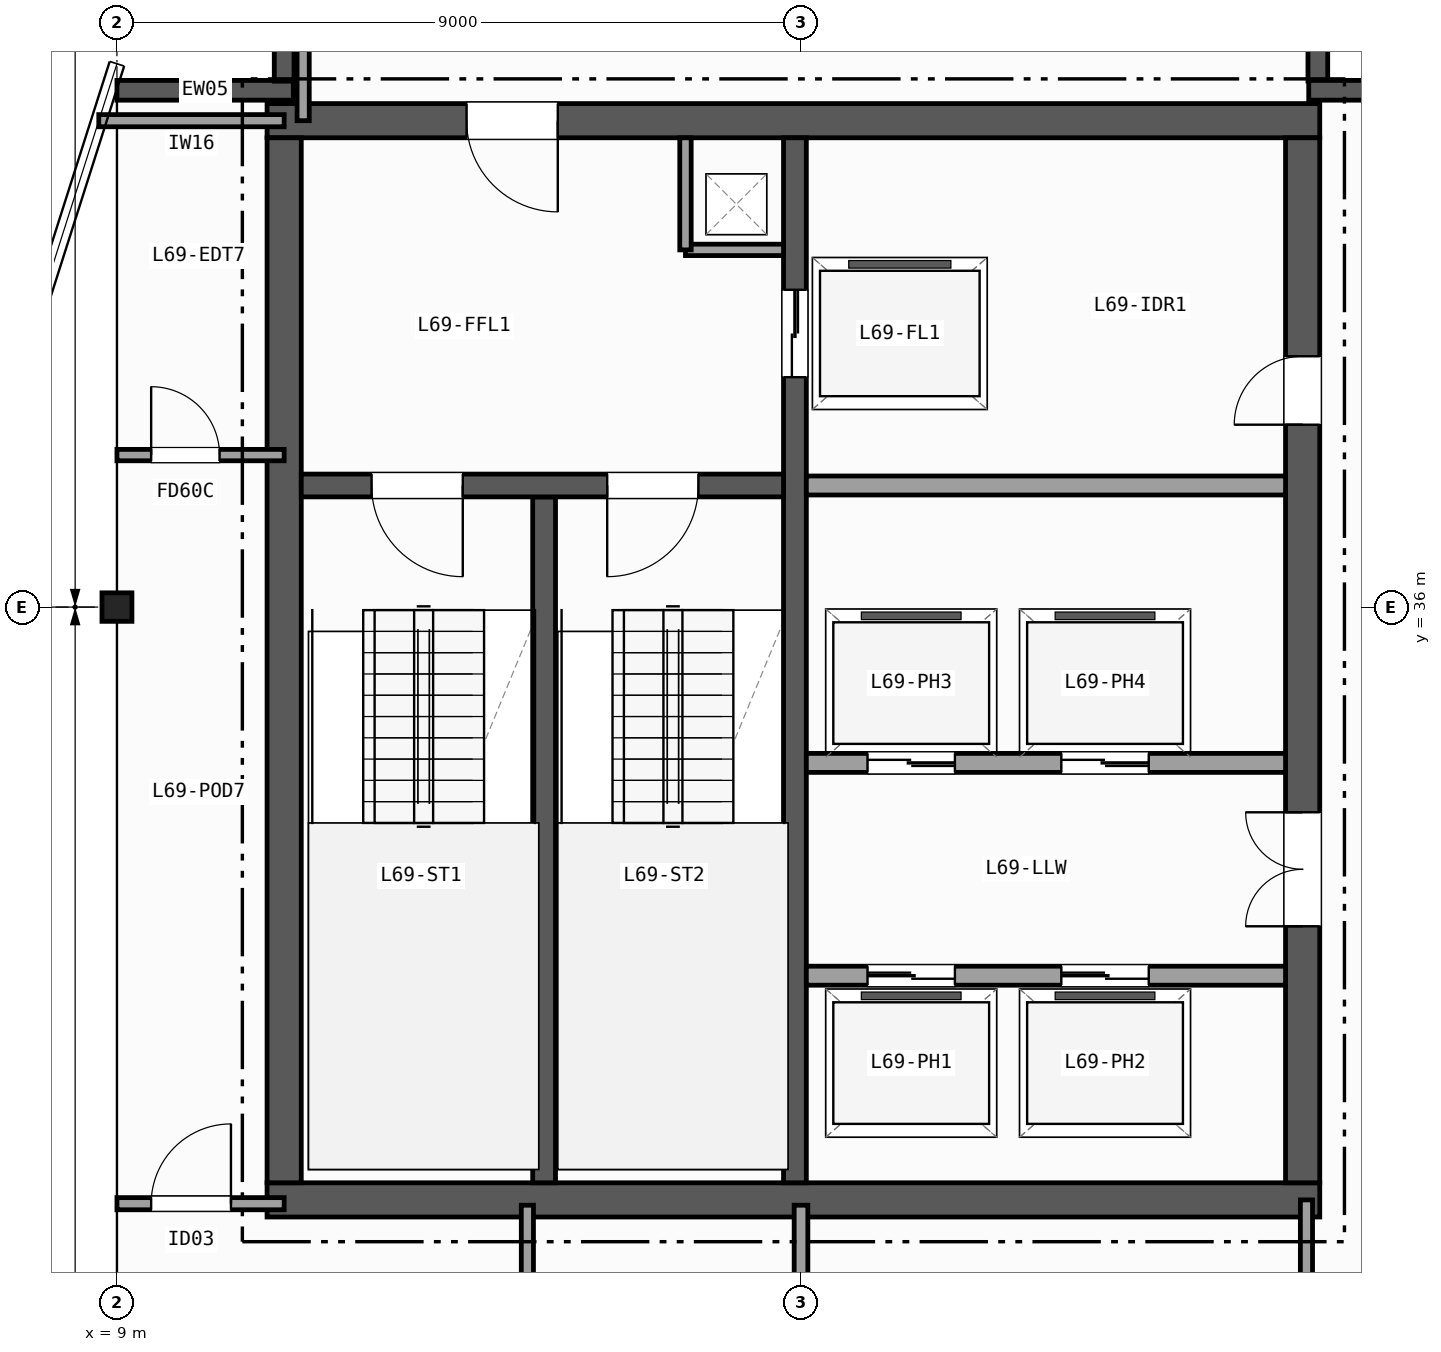
"""IFC4 building model, lengths in metres.
Left out: names, types, materials, properties, quantities, classifications, styles, units other than length and angle.
Written with IfcOpenShell. Run it as: python <this file> out.ifc"""

import sys

from ifc_helpers import new_model, si_unit, direction, frame, frame_2d, origin, origin_2d, place, context, subcontext, project, spatial, rectangle, i_section, extrude, element, fill, save


model = new_model("IFC4")
c1 = context("Model", 3, precision=1e-05, world=origin(), true_north=direction((0.0, 1.0)))
c2 = subcontext(c1, "Body", "Model", "MODEL_VIEW")
j1 = project(units=[si_unit("LENGTHUNIT", "METRE"), si_unit("PLANEANGLEUNIT", "RADIAN")], contexts=[c1])
p1 = place(None, origin())
s1 = spatial("IfcSite", under=j1, at=p1, CompositionType="ELEMENT")
p2 = place(p1, origin())
s2 = spatial("IfcBuilding", under=s1, at=p2, CompositionType="ELEMENT")
p3 = place(p2, frame((0.0, 0.0, 274.1)))
s3 = spatial("IfcBuildingStorey", under=s2, at=p3, CompositionType="ELEMENT", Elevation=274.1)
p4 = place(p3, frame((9.0, 36.0, 0.0), z_axis=(0.0, 0.0, 1.0), x_axis=(1.0, 0.0, 0.0)))
e1 = element("IfcColumn", 1, at=p4, inside=s3, PredefinedType="COLUMN", context=c2, shape_type="SweptSolid", body=[
    extrude(i_section(OverallWidth=0.394, OverallDepth=0.375, WebThickness=0.017, FlangeThickness=0.028, FilletRadius=0.015, at=origin_2d()), origin(), (0.0, 0.0, 1.0), 3.7),
])
p5 = place(p3, frame((9.0, 42.8, 0.0), z_axis=(0.0, 0.0, 1.0), x_axis=(1.0, 0.0, 0.0)))
e2 = element("IfcWall", 2, at=p5, inside=s3, PredefinedType="SOLIDWALL", context=c2, shape_type="SweptSolid", body=[
    extrude(rectangle(XDim=2.32, YDim=0.26, at=frame_2d((1.16, 0.0))), origin(), (0.0, 0.0, 1.0), 3.42),
])
for number, where, z_axis, x_axis in (
    (3, (11.2, 42.92, 0.0), (0.0, 0.0, 1.0), (0.0, 1.0, 0.0)),
    (4, (24.8, 45.0, 0.0), (0.0, 0.0, 1.0), (0.0, -1.0, 0.0)),
):
    element("IfcWall", number, at=place(p3, frame(where, z_axis=z_axis, x_axis=x_axis)), inside=s3, PredefinedType="SOLIDWALL", context=c2, shape_type="SweptSolid", body=[
        extrude(rectangle(XDim=2.08, YDim=0.26, at=frame_2d((1.04, 0.0))), origin(), (0.0, 0.0, 1.0), 3.42),
    ])
p6 = place(p3, frame((24.68, 42.8, 0.0), z_axis=(0.0, 0.0, 1.0), x_axis=(1.0, 0.0, 0.0)))
e5 = element("IfcWall", 5, at=p6, inside=s3, PredefinedType="SOLIDWALL", context=c2, shape_type="SweptSolid", body=[
    extrude(rectangle(XDim=2.32, YDim=0.26, at=frame_2d((1.16, 0.0))), origin(), (0.0, 0.0, 1.0), 3.42),
])
p7 = place(p3, frame((10.975, 28.2, 0.0), z_axis=(0.0, 0.0, 1.0), x_axis=(1.0, 0.0, 0.0)))
e6 = element("IfcWall", 6, at=p7, inside=s3, PredefinedType="SHEAR", context=c2, shape_type="SweptSolid", body=[
    extrude(rectangle(XDim=13.85, YDim=0.45, at=frame_2d((6.925, 0.0))), origin(), (0.0, 0.0, 1.0), 3.42),
])
p8 = place(p3, frame((24.825, 42.4, 0.0), z_axis=(0.0, 0.0, 1.0), x_axis=(-1.0, 0.0, 0.0)))
e7 = element("IfcWall", 7, at=p8, inside=s3, PredefinedType="SHEAR", context=c2, shape_type="SweptSolid", body=[
    extrude(rectangle(XDim=13.85, YDim=0.45, at=frame_2d((6.925, 0.0))), origin(), (0.0, 0.0, 1.0), 3.42),
])
p9 = place(p8, frame((10.025, 0.0, 0.0)))
e8 = element("IfcOpeningElement", 8, at=p9, cuts=e7, PredefinedType="OPENING", context=c2, shape_type="SweptSolid", body=[
    extrude(rectangle(XDim=1.2, YDim=2.15, at=frame_2d((0.6, 1.075))), frame((0.0, 0.235, 0.0), z_axis=(0.0, -1.0, 0.0), x_axis=(1.0, 0.0, 0.0)), (0.0, 0.0, 1.0), 0.47),
])
p10 = place(p3, frame((11.2, 42.175, 0.0), z_axis=(0.0, 0.0, 1.0), x_axis=(0.0, -1.0, 0.0)))
e9 = element("IfcWall", 9, at=p10, inside=s3, PredefinedType="SHEAR", context=c2, shape_type="SweptSolid", body=[
    extrude(rectangle(XDim=13.75, YDim=0.45, at=frame_2d((6.875, 0.0))), origin(), (0.0, 0.0, 1.0), 3.42),
])
p11 = place(p3, frame((24.6, 28.425, 0.0), z_axis=(0.0, 0.0, 1.0), x_axis=(0.0, 1.0, 0.0)))
e10 = element("IfcWall", 10, at=p11, inside=s3, PredefinedType="SHEAR", context=c2, shape_type="SweptSolid", body=[
    extrude(rectangle(XDim=13.75, YDim=0.45, at=frame_2d((6.875, 0.0))), origin(), (0.0, 0.0, 1.0), 3.42),
])
p12 = place(p11, frame((3.375, 0.0, 0.0)))
e11 = element("IfcOpeningElement", 11, at=p12, cuts=e10, PredefinedType="OPENING", context=c2, shape_type="SweptSolid", body=[
    extrude(rectangle(XDim=1.5, YDim=2.2, at=frame_2d((0.75, 1.1))), frame((0.0, 0.235, 0.0), z_axis=(0.0, -1.0, 0.0), x_axis=(1.0, 0.0, 0.0)), (0.0, 0.0, 1.0), 0.47),
])
p13 = place(p11, frame((9.975, 0.0, 0.0)))
e12 = element("IfcOpeningElement", 12, at=p13, cuts=e10, PredefinedType="OPENING", context=c2, shape_type="SweptSolid", body=[
    extrude(rectangle(XDim=0.9, YDim=2.1, at=frame_2d((0.45, 1.05))), frame((0.0, 0.235, 0.0), z_axis=(0.0, -1.0, 0.0), x_axis=(1.0, 0.0, 0.0)), (0.0, 0.0, 1.0), 0.47),
])
p14 = place(p3, frame((14.62, 28.425, 0.0), z_axis=(0.0, 0.0, 1.0), x_axis=(0.0, 1.0, 0.0)))
e13 = element("IfcWall", 13, at=p14, inside=s3, PredefinedType="SHEAR", context=c2, shape_type="SweptSolid", body=[
    extrude(rectangle(XDim=9.025, YDim=0.3, at=frame_2d((4.512, 0.0))), origin(), (0.0, 0.0, 1.0), 3.42),
])
p15 = place(p3, frame((17.92, 42.175, 0.0), z_axis=(0.0, 0.0, 1.0), x_axis=(0.0, -1.0, 0.0)))
e14 = element("IfcWall", 14, at=p15, inside=s3, PredefinedType="SHEAR", context=c2, shape_type="SweptSolid", body=[
    extrude(rectangle(XDim=13.75, YDim=0.3, at=frame_2d((6.875, 0.0))), origin(), (0.0, 0.0, 1.0), 3.42),
])
p16 = place(p15, frame((2.0, 0.0, 0.0)))
e15 = element("IfcOpeningElement", 15, at=p16, cuts=e14, PredefinedType="OPENING", context=c2, shape_type="SweptSolid", body=[
    extrude(rectangle(XDim=1.15, YDim=2.15, at=frame_2d((0.575, 1.075))), frame((0.0, 0.16, 0.0), z_axis=(0.0, -1.0, 0.0), x_axis=(1.0, 0.0, 0.0)), (0.0, 0.0, 1.0), 0.32),
])
p17 = place(p3, frame((17.77, 37.6, 0.0), z_axis=(0.0, 0.0, 1.0), x_axis=(-1.0, 0.0, 0.0)))
e16 = element("IfcWall", 16, at=p17, inside=s3, PredefinedType="SHEAR", context=c2, shape_type="SweptSolid", body=[
    extrude(rectangle(XDim=6.345, YDim=0.3, at=frame_2d((3.172, 0.0))), origin(), (0.0, 0.0, 1.0), 3.42),
])
p18 = place(p17, frame((4.22, 0.0, 0.0)))
e17 = element("IfcOpeningElement", 17, at=p18, cuts=e16, PredefinedType="OPENING", context=c2, shape_type="SweptSolid", body=[
    extrude(rectangle(XDim=1.2, YDim=2.15, at=frame_2d((0.6, 1.075))), frame((0.0, 0.16, 0.0), z_axis=(0.0, -1.0, 0.0), x_axis=(1.0, 0.0, 0.0)), (0.0, 0.0, 1.0), 0.32),
])
p19 = place(p17, frame((1.12, 0.0, 0.0)))
e18 = element("IfcOpeningElement", 18, at=p19, cuts=e16, PredefinedType="OPENING", context=c2, shape_type="SweptSolid", body=[
    extrude(rectangle(XDim=1.2, YDim=2.15, at=frame_2d((0.6, 1.075))), frame((0.0, 0.16, 0.0), z_axis=(0.0, -1.0, 0.0), x_axis=(1.0, 0.0, 0.0)), (0.0, 0.0, 1.0), 0.32),
])
p20 = place(p3, frame((16.48, 40.7, 0.0), z_axis=(0.0, 0.0, 1.0), x_axis=(1.0, 0.0, 0.0)))
e19 = element("IfcWall", 19, at=p20, inside=s3, PredefinedType="PARTITIONING", context=c2, shape_type="SweptSolid", body=[
    extrude(rectangle(XDim=1.29, YDim=0.15, at=frame_2d((0.645, 0.0))), origin(), (0.0, 0.0, 1.0), 3.42),
])
p21 = place(p3, frame((16.48, 40.7, 0.0), z_axis=(0.0, 0.0, 1.0), x_axis=(0.0, 1.0, 0.0)))
e20 = element("IfcWall", 20, at=p21, inside=s3, PredefinedType="PARTITIONING", context=c2, shape_type="SweptSolid", body=[
    extrude(rectangle(XDim=1.475, YDim=0.15, at=frame_2d((0.738, 0.0))), origin(), (0.0, 0.0, 1.0), 3.42),
])
p22 = place(p3, frame((18.07, 37.6, 0.0), z_axis=(0.0, 0.0, 1.0), x_axis=(1.0, 0.0, 0.0)))
e21 = element("IfcWall", 21, at=p22, inside=s3, PredefinedType="PARTITIONING", context=c2, shape_type="SweptSolid", body=[
    extrude(rectangle(XDim=6.305, YDim=0.25, at=frame_2d((3.152, 0.0))), origin(), (0.0, 0.0, 1.0), 3.42),
])
p23 = place(p3, frame((18.07, 31.15, 0.0), z_axis=(0.0, 0.0, 1.0), x_axis=(1.0, 0.0, 0.0)))
e22 = element("IfcWall", 22, at=p23, inside=s3, PredefinedType="PARTITIONING", context=c2, shape_type="SweptSolid", body=[
    extrude(rectangle(XDim=6.305, YDim=0.25, at=frame_2d((3.152, 0.0))), origin(), (0.0, 0.0, 1.0), 3.42),
])
p24 = place(p23, frame((0.805, 0.0, 0.0)))
e23 = element("IfcOpeningElement", 23, at=p24, cuts=e22, PredefinedType="OPENING", context=c2, shape_type="SweptSolid", body=[
    extrude(rectangle(XDim=1.15, YDim=2.15, at=frame_2d((0.575, 1.075))), frame((0.0, 0.135, 0.0), z_axis=(0.0, -1.0, 0.0), x_axis=(1.0, 0.0, 0.0)), (0.0, 0.0, 1.0), 0.27),
])
p25 = place(p23, frame((3.355, 0.0, 0.0)))
e24 = element("IfcOpeningElement", 24, at=p25, cuts=e22, PredefinedType="OPENING", context=c2, shape_type="SweptSolid", body=[
    extrude(rectangle(XDim=1.15, YDim=2.15, at=frame_2d((0.575, 1.075))), frame((0.0, 0.135, 0.0), z_axis=(0.0, -1.0, 0.0), x_axis=(1.0, 0.0, 0.0)), (0.0, 0.0, 1.0), 0.27),
])
p26 = place(p3, frame((24.375, 33.95, 0.0), z_axis=(0.0, 0.0, 1.0), x_axis=(-1.0, 0.0, 0.0)))
e25 = element("IfcWall", 25, at=p26, inside=s3, PredefinedType="PARTITIONING", context=c2, shape_type="SweptSolid", body=[
    extrude(rectangle(XDim=6.305, YDim=0.25, at=frame_2d((3.152, 0.0))), origin(), (0.0, 0.0, 1.0), 3.42),
])
p27 = place(p26, frame((4.35, 0.0, 0.0)))
e26 = element("IfcOpeningElement", 26, at=p27, cuts=e25, PredefinedType="OPENING", context=c2, shape_type="SweptSolid", body=[
    extrude(rectangle(XDim=1.15, YDim=2.15, at=frame_2d((0.575, 1.075))), frame((0.0, 0.135, 0.0), z_axis=(0.0, -1.0, 0.0), x_axis=(1.0, 0.0, 0.0)), (0.0, 0.0, 1.0), 0.27),
])
p28 = place(p26, frame((1.8, 0.0, 0.0)))
e27 = element("IfcOpeningElement", 27, at=p28, cuts=e25, PredefinedType="OPENING", context=c2, shape_type="SweptSolid", body=[
    extrude(rectangle(XDim=1.15, YDim=2.15, at=frame_2d((0.575, 1.075))), frame((0.0, 0.135, 0.0), z_axis=(0.0, -1.0, 0.0), x_axis=(1.0, 0.0, 0.0)), (0.0, 0.0, 1.0), 0.27),
])
p29 = place(p3, frame((9.0, 28.15, 0.0), z_axis=(0.0, 0.0, 1.0), x_axis=(1.0, 0.0, 0.0)))
e28 = element("IfcWall", 28, at=p29, inside=s3, PredefinedType="PARTITIONING", context=c2, shape_type="SweptSolid", body=[
    extrude(rectangle(XDim=2.2, YDim=0.16, at=frame_2d((1.1, 0.0))), origin(), (0.0, 0.0, 1.0), 2.707),
])
p30 = place(p29, frame((0.45, 0.0, 0.0)))
e29 = element("IfcOpeningElement", 29, at=p30, cuts=e28, PredefinedType="OPENING", context=c2, shape_type="SweptSolid", body=[
    extrude(rectangle(XDim=1.05, YDim=2.15, at=frame_2d((0.525, 1.075))), frame((0.0, 0.09, 0.0), z_axis=(0.0, -1.0, 0.0), x_axis=(1.0, 0.0, 0.0)), (0.0, 0.0, 1.0), 0.18),
])
p31 = place(p3, frame((8.761, 42.4, 0.0), z_axis=(0.0, 0.0, 1.0), x_axis=(1.0, 0.0, 0.0)))
e30 = element("IfcWall", 30, at=p31, inside=s3, PredefinedType="PARTITIONING", context=c2, shape_type="SweptSolid", body=[
    extrude(rectangle(XDim=2.439, YDim=0.16, at=frame_2d((1.219, 0.0))), origin(), (0.0, 0.0, 1.0), 3.42),
])
p32 = place(p3, frame((11.45, 42.4, 0.0), z_axis=(0.0, 0.0, 1.0), x_axis=(0.0, 1.0, 0.0)))
e31 = element("IfcWall", 31, at=p32, inside=s3, PredefinedType="PARTITIONING", context=c2, shape_type="SweptSolid", body=[
    extrude(rectangle(XDim=2.666, YDim=0.16, at=frame_2d((1.333, 0.0))), origin(), (0.0, 0.0, 1.0), 3.42),
])
p33 = place(p3, frame((9.0, 38.0, 0.0), z_axis=(0.0, 0.0, 1.0), x_axis=(1.0, 0.0, 0.0)))
e32 = element("IfcWall", 32, at=p33, inside=s3, PredefinedType="PARTITIONING", context=c2, shape_type="SweptSolid", body=[
    extrude(rectangle(XDim=2.2, YDim=0.15, at=frame_2d((1.1, 0.0))), origin(), (0.0, 0.0, 1.0), 3.42),
])
p34 = place(p33, frame((0.45, 0.0, 0.0)))
e33 = element("IfcOpeningElement", 33, at=p34, cuts=e32, PredefinedType="OPENING", context=c2, shape_type="SweptSolid", body=[
    extrude(rectangle(XDim=0.9, YDim=2.1, at=frame_2d((0.45, 1.05))), frame((0.0, 0.085, 0.0), z_axis=(0.0, -1.0, 0.0), x_axis=(1.0, 0.0, 0.0)), (0.0, 0.0, 1.0), 0.17),
])
p35 = place(p3, frame((24.65, 9.0, 0.0), z_axis=(0.0, 0.0, 1.0), x_axis=(0.0, 1.0, 0.0)))
e34 = element("IfcWall", 34, at=p35, inside=s3, PredefinedType="PARTITIONING", context=c2, shape_type="SweptSolid", body=[
    extrude(rectangle(XDim=19.2, YDim=0.16, at=frame_2d((9.6, 0.0))), origin(), (0.0, 0.0, 1.0), 2.707),
])
p36 = place(p35, frame((10.2, 0.0, 0.0)))
e35 = element("IfcOpeningElement", 35, at=p36, cuts=e34, PredefinedType="OPENING", context=c2, shape_type="SweptSolid", body=[
    extrude(rectangle(XDim=0.86, YDim=2.05, at=frame_2d((0.43, 1.025))), frame((0.0, 0.09, 0.0), z_axis=(0.0, -1.0, 0.0), x_axis=(1.0, 0.0, 0.0)), (0.0, 0.0, 1.0), 0.18),
])
p37 = place(p35, frame((2.55, 0.0, 0.0)))
e36 = element("IfcOpeningElement", 36, at=p37, cuts=e34, PredefinedType="OPENING", context=c2, shape_type="SweptSolid", body=[
    extrude(rectangle(XDim=0.95, YDim=2.1, at=frame_2d((0.475, 1.05))), frame((0.0, 0.09, 0.0), z_axis=(0.0, -1.0, 0.0), x_axis=(1.0, 0.0, 0.0)), (0.0, 0.0, 1.0), 0.18),
])
p38 = place(p3, frame((18.0, 17.4, 0.0), z_axis=(0.0, 0.0, 1.0), x_axis=(0.0, 1.0, 0.0)))
e37 = element("IfcWall", 37, at=p38, inside=s3, PredefinedType="PARTITIONING", context=c2, shape_type="SweptSolid", body=[
    extrude(rectangle(XDim=10.73, YDim=0.18, at=frame_2d((5.365, 0.0))), origin(), (0.0, 0.0, 1.0), 2.789),
])
p39 = place(p38, frame((4.1, 0.0, 0.0)))
e38 = element("IfcOpeningElement", 38, at=p39, cuts=e37, PredefinedType="OPENING", context=c2, shape_type="SweptSolid", body=[
    extrude(rectangle(XDim=1.0, YDim=2.1, at=frame_2d((0.5, 1.05))), frame((0.0, 0.1, 0.0), z_axis=(0.0, -1.0, 0.0), x_axis=(1.0, 0.0, 0.0)), (0.0, 0.0, 1.0), 0.2),
])
p40 = place(p3, frame((14.4, 18.0, 0.0), z_axis=(0.0, 0.0, 1.0), x_axis=(0.0, 1.0, 0.0)))
e39 = element("IfcWall", 39, at=p40, inside=s3, PredefinedType="PARTITIONING", context=c2, shape_type="SweptSolid", body=[
    extrude(rectangle(XDim=10.13, YDim=0.16, at=frame_2d((5.065, 0.0))), origin(), (0.0, 0.0, 1.0), 2.789),
])
p41 = place(p40, frame((2.5, 0.0, 0.0)))
e40 = element("IfcOpeningElement", 40, at=p41, cuts=e39, PredefinedType="OPENING", context=c2, shape_type="SweptSolid", body=[
    extrude(rectangle(XDim=1.05, YDim=2.15, at=frame_2d((0.525, 1.075))), frame((0.0, 0.09, 0.0), z_axis=(0.0, -1.0, 0.0), x_axis=(1.0, 0.0, 0.0)), (0.0, 0.0, 1.0), 0.18),
])
p42 = place(p18, origin())
e41 = element("IfcDoor", 41, at=p42, inside=s3, OperationType="SINGLE_SWING_LEFT", PredefinedType="DOOR", context=c2, shape_type="SweptSolid", body=[
    extrude(rectangle(XDim=1.2, YDim=2.15, at=frame_2d((0.6, 1.075))), frame((0.0, 0.025, 0.0), z_axis=(0.0, -1.0, 0.0), x_axis=(1.0, 0.0, 0.0)), (0.0, 0.0, 1.0), 0.05),
])
fill(e17, e41)
p43 = place(p19, origin())
e42 = element("IfcDoor", 42, at=p43, inside=s3, OperationType="SINGLE_SWING_RIGHT", PredefinedType="DOOR", context=c2, shape_type="SweptSolid", body=[
    extrude(rectangle(XDim=1.2, YDim=2.15, at=frame_2d((0.6, 1.075))), frame((0.0, 0.025, 0.0), z_axis=(0.0, -1.0, 0.0), x_axis=(1.0, 0.0, 0.0)), (0.0, 0.0, 1.0), 0.05),
])
fill(e18, e42)
p44 = place(p12, origin())
e43 = element("IfcDoor", 43, at=p44, inside=s3, OperationType="DOUBLE_DOOR_SINGLE_SWING", PredefinedType="DOOR", context=c2, shape_type="SweptSolid", body=[
    extrude(rectangle(XDim=1.5, YDim=2.2, at=frame_2d((0.75, 1.1))), frame((0.0, 0.025, 0.0), z_axis=(0.0, -1.0, 0.0), x_axis=(1.0, 0.0, 0.0)), (0.0, 0.0, 1.0), 0.05),
])
fill(e11, e43)
p45 = place(p9, origin())
e44 = element("IfcDoor", 44, at=p45, inside=s3, OperationType="SINGLE_SWING_LEFT", PredefinedType="DOOR", context=c2, shape_type="SweptSolid", body=[
    extrude(rectangle(XDim=1.2, YDim=2.15, at=frame_2d((0.6, 1.075))), frame((0.0, 0.025, 0.0), z_axis=(0.0, -1.0, 0.0), x_axis=(1.0, 0.0, 0.0)), (0.0, 0.0, 1.0), 0.05),
])
fill(e8, e44)
p46 = place(p13, origin())
e45 = element("IfcDoor", 45, at=p46, inside=s3, OperationType="SINGLE_SWING_LEFT", PredefinedType="DOOR", context=c2, shape_type="SweptSolid", body=[
    extrude(rectangle(XDim=0.9, YDim=2.1, at=frame_2d((0.45, 1.05))), frame((0.0, 0.025, 0.0), z_axis=(0.0, -1.0, 0.0), x_axis=(1.0, 0.0, 0.0)), (0.0, 0.0, 1.0), 0.05),
])
fill(e12, e45)
p47 = place(p16, origin())
e46 = element("IfcDoor", 46, at=p47, inside=s3, OperationType="DOUBLE_DOOR_SLIDING", PredefinedType="DOOR", context=c2, shape_type="SweptSolid", body=[
    extrude(rectangle(XDim=1.15, YDim=2.15, at=frame_2d((0.575, 1.075))), frame((0.0, 0.025, 0.0), z_axis=(0.0, -1.0, 0.0), x_axis=(1.0, 0.0, 0.0)), (0.0, 0.0, 1.0), 0.05),
])
fill(e15, e46)
p48 = place(p24, origin())
e47 = element("IfcDoor", 47, at=p48, inside=s3, OperationType="DOUBLE_DOOR_SLIDING", PredefinedType="DOOR", context=c2, shape_type="SweptSolid", body=[
    extrude(rectangle(XDim=1.15, YDim=2.15, at=frame_2d((0.575, 1.075))), frame((0.0, 0.025, 0.0), z_axis=(0.0, -1.0, 0.0), x_axis=(1.0, 0.0, 0.0)), (0.0, 0.0, 1.0), 0.05),
])
fill(e23, e47)
p49 = place(p25, origin())
e48 = element("IfcDoor", 48, at=p49, inside=s3, OperationType="DOUBLE_DOOR_SLIDING", PredefinedType="DOOR", context=c2, shape_type="SweptSolid", body=[
    extrude(rectangle(XDim=1.15, YDim=2.15, at=frame_2d((0.575, 1.075))), frame((0.0, 0.025, 0.0), z_axis=(0.0, -1.0, 0.0), x_axis=(1.0, 0.0, 0.0)), (0.0, 0.0, 1.0), 0.05),
])
fill(e24, e48)
p50 = place(p27, origin())
e49 = element("IfcDoor", 49, at=p50, inside=s3, OperationType="DOUBLE_DOOR_SLIDING", PredefinedType="DOOR", context=c2, shape_type="SweptSolid", body=[
    extrude(rectangle(XDim=1.15, YDim=2.15, at=frame_2d((0.575, 1.075))), frame((0.0, 0.025, 0.0), z_axis=(0.0, -1.0, 0.0), x_axis=(1.0, 0.0, 0.0)), (0.0, 0.0, 1.0), 0.05),
])
fill(e26, e49)
p51 = place(p28, origin())
e50 = element("IfcDoor", 50, at=p51, inside=s3, OperationType="DOUBLE_DOOR_SLIDING", PredefinedType="DOOR", context=c2, shape_type="SweptSolid", body=[
    extrude(rectangle(XDim=1.15, YDim=2.15, at=frame_2d((0.575, 1.075))), frame((0.0, 0.025, 0.0), z_axis=(0.0, -1.0, 0.0), x_axis=(1.0, 0.0, 0.0)), (0.0, 0.0, 1.0), 0.05),
])
fill(e27, e50)
p52 = place(p30, origin())
e51 = element("IfcDoor", 51, at=p52, inside=s3, OperationType="SINGLE_SWING_RIGHT", PredefinedType="DOOR", context=c2, shape_type="SweptSolid", body=[
    extrude(rectangle(XDim=1.05, YDim=2.15, at=frame_2d((0.525, 1.075))), frame((0.0, 0.025, 0.0), z_axis=(0.0, -1.0, 0.0), x_axis=(1.0, 0.0, 0.0)), (0.0, 0.0, 1.0), 0.05),
])
fill(e29, e51)
p53 = place(p34, origin())
e52 = element("IfcDoor", 52, at=p53, inside=s3, OperationType="SINGLE_SWING_LEFT", PredefinedType="DOOR", context=c2, shape_type="SweptSolid", body=[
    extrude(rectangle(XDim=0.9, YDim=2.1, at=frame_2d((0.45, 1.05))), frame((0.0, 0.025, 0.0), z_axis=(0.0, -1.0, 0.0), x_axis=(1.0, 0.0, 0.0)), (0.0, 0.0, 1.0), 0.05),
])
fill(e33, e52)
save(model, sys.argv[1])
